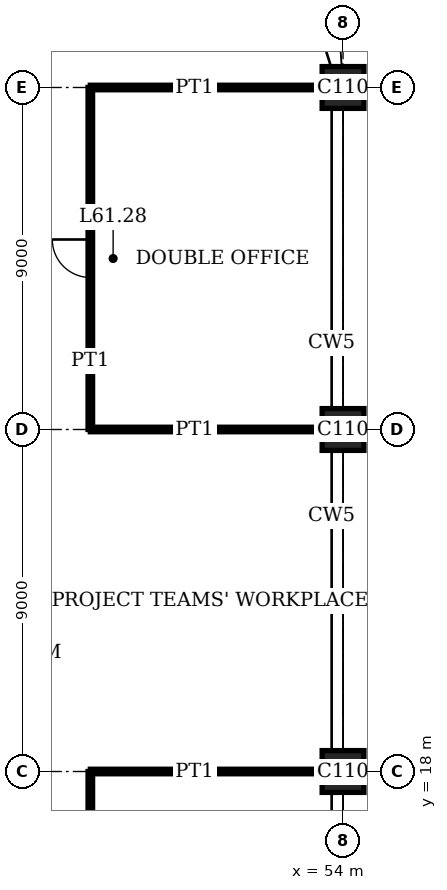
"""IFC4 building model, lengths in metres.
Left out: names, types, materials, properties, quantities, classifications, styles, units other than length and angle.
Written with IfcOpenShell. Run it as: python <this file> out.ifc"""

import sys

from ifc_helpers import new_model, si_unit, direction, frame, frame_2d, origin, origin_2d, place, context, subcontext, project, spatial, rectangle, extrude, element, fill, save


model = new_model("IFC4")
c1 = context("Model", 3, precision=1e-05, world=origin(), true_north=direction((0.0, 1.0)))
c2 = subcontext(c1, "Body", "Model", "MODEL_VIEW")
j1 = project(units=[si_unit("LENGTHUNIT", "METRE"), si_unit("PLANEANGLEUNIT", "RADIAN")], contexts=[c1])
p1 = place(None, origin())
s1 = spatial("IfcSite", under=j1, at=p1, CompositionType="ELEMENT")
p2 = place(p1, origin())
s2 = spatial("IfcBuilding", under=s1, at=p2, CompositionType="ELEMENT")
p3 = place(p2, frame((0.0, 0.0, 251.4)))
s3 = spatial("IfcBuildingStorey", under=s2, at=p3, CompositionType="ELEMENT", Elevation=251.4)
for number, where, z_axis, x_axis in (
    (1, (54.0, 18.0, 0.0), (0.0, 0.0, 1.0), (1.0, 0.0, 0.0)),
    (2, (54.0, 27.0, 0.0), (0.0, 0.0, 1.0), (1.0, 0.0, 0.0)),
    (3, (54.0, 36.0, 0.0), (0.0, 0.0, 1.0), (1.0, 0.0, 0.0)),
):
    element("IfcColumn", number, at=place(p3, frame(where, z_axis=z_axis, x_axis=x_axis)), inside=s3, PredefinedType="COLUMN", context=c2, shape_type="SweptSolid", body=[
        extrude(rectangle(XDim=1.1, YDim=1.1, at=origin_2d()), origin(), (0.0, 0.0, 1.0), 4.0),
    ])
for number, where, z_axis, x_axis in (
    (4, (47.35, 18.0, 0.0), (0.0, 0.0, 1.0), (1.0, 0.0, 0.0)),
    (5, (47.35, 27.0, 0.0), (0.0, 0.0, 1.0), (1.0, 0.0, 0.0)),
    (6, (47.35, 36.0, 0.0), (0.0, 0.0, 1.0), (1.0, 0.0, 0.0)),
):
    element("IfcWall", number, at=place(p3, frame(where, z_axis=z_axis, x_axis=x_axis)), inside=s3, PredefinedType="PARTITIONING", context=c2, shape_type="SweptSolid", body=[
        extrude(rectangle(XDim=6.1, YDim=0.12, at=frame_2d((3.05, 0.0))), origin(), (0.0, 0.0, 1.0), 3.05),
    ])
p4 = place(p3, frame((47.35, 9.0, 0.0), z_axis=(0.0, 0.0, 1.0), x_axis=(0.0, 1.0, 0.0)))
e7 = element("IfcWall", 7, at=p4, inside=s3, PredefinedType="PARTITIONING", context=c2, shape_type="SweptSolid", body=[
    extrude(rectangle(XDim=9.0, YDim=0.12, at=frame_2d((4.5, 0.0))), origin(), (0.0, 0.0, 1.0), 3.75),
])
p5 = place(p4, frame((4.0, 0.0, 0.0)))
e8 = element("IfcOpeningElement", 8, at=p5, cuts=e7, PredefinedType="OPENING", context=c2, shape_type="SweptSolid", body=[
    extrude(rectangle(XDim=1.0, YDim=2.4, at=frame_2d((0.5, 1.2))), frame((0.0, 0.07, 0.0), z_axis=(0.0, -1.0, 0.0), x_axis=(1.0, 0.0, 0.0)), (0.0, 0.0, 1.0), 0.14),
])
p6 = place(p3, frame((47.35, 27.0, 0.0), z_axis=(0.0, 0.0, 1.0), x_axis=(0.0, 1.0, 0.0)))
e9 = element("IfcWall", 9, at=p6, inside=s3, PredefinedType="PARTITIONING", context=c2, shape_type="SweptSolid", body=[
    extrude(rectangle(XDim=9.0, YDim=0.12, at=frame_2d((4.5, 0.0))), origin(), (0.0, 0.0, 1.0), 3.75),
])
p7 = place(p6, frame((4.0, 0.0, 0.0)))
e10 = element("IfcOpeningElement", 10, at=p7, cuts=e9, PredefinedType="OPENING", context=c2, shape_type="SweptSolid", body=[
    extrude(rectangle(XDim=1.0, YDim=2.4, at=frame_2d((0.5, 1.2))), frame((0.0, 0.07, 0.0), z_axis=(0.0, -1.0, 0.0), x_axis=(1.0, 0.0, 0.0)), (0.0, 0.0, 1.0), 0.14),
])
p8 = place(p7, origin())
e11 = element("IfcDoor", 11, at=p8, inside=s3, OperationType="SINGLE_SWING_LEFT", PredefinedType="DOOR", context=c2, shape_type="SweptSolid", body=[
    extrude(rectangle(XDim=1.0, YDim=2.4, at=frame_2d((0.5, 1.2))), frame((0.0, 0.025, 0.0), z_axis=(0.0, -1.0, 0.0), x_axis=(1.0, 0.0, 0.0)), (0.0, 0.0, 1.0), 0.05),
])
fill(e10, e11)
save(model, sys.argv[1])
